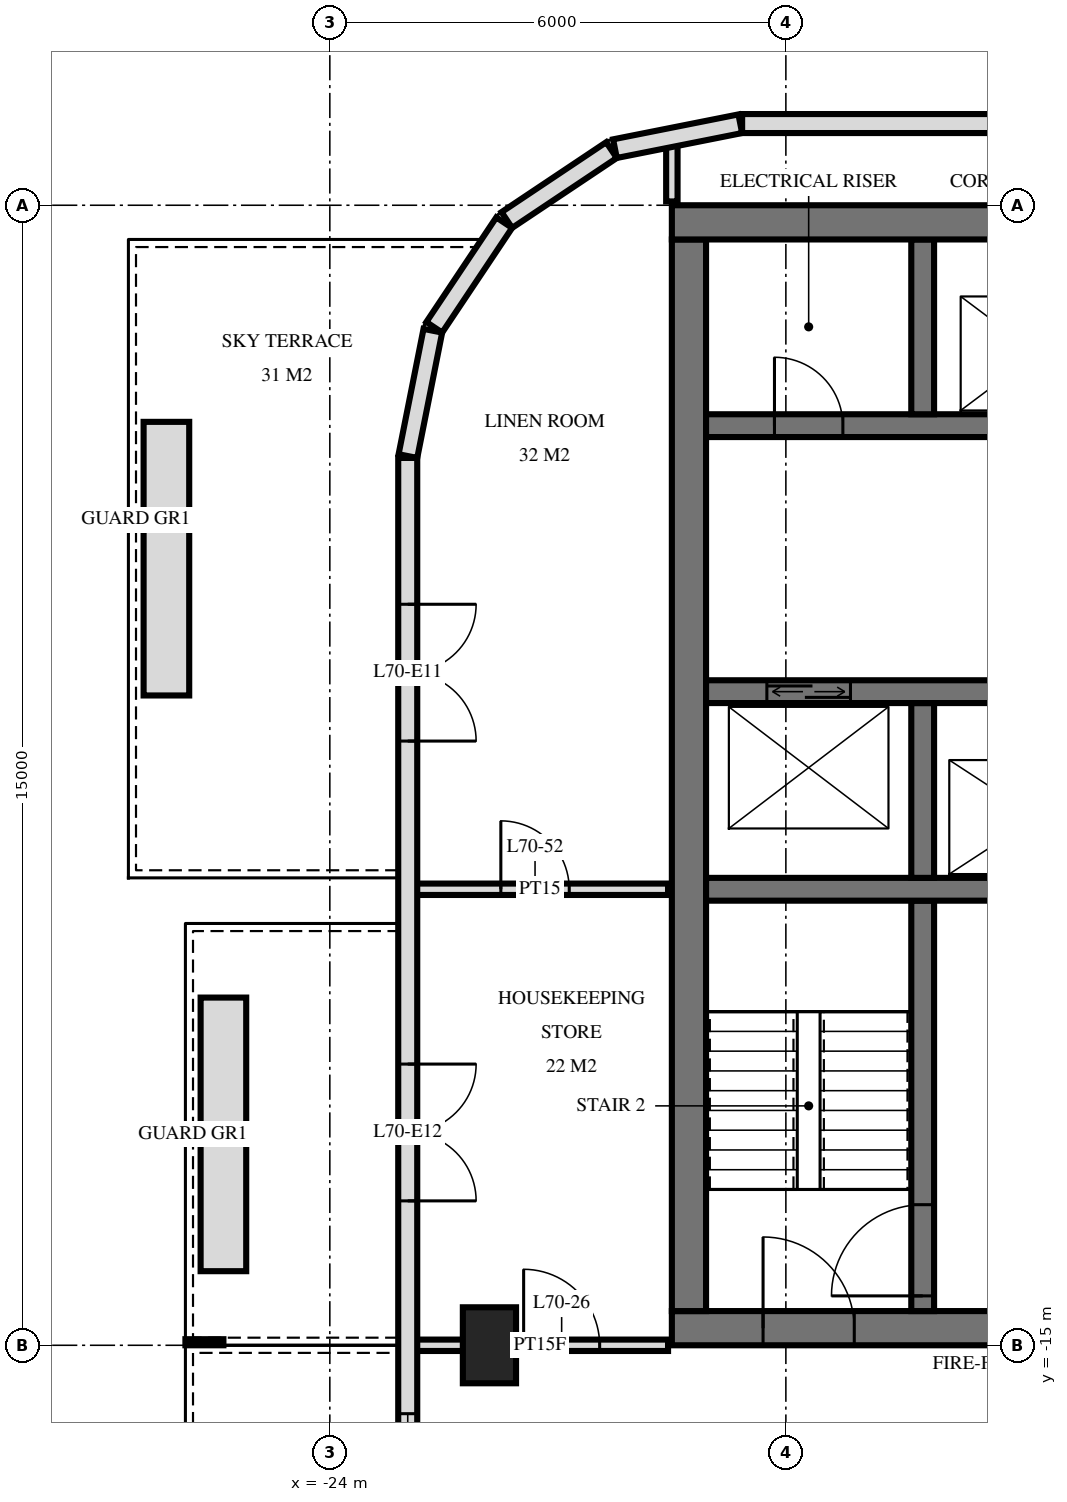
"""IFC4 building model, lengths in metres.
Left out: names, types, materials, properties, quantities, classifications, styles, units other than length and angle.
Written with IfcOpenShell. Run it as: python <this file> out.ifc"""

import sys

from ifc_helpers import new_model, si_unit, direction, frame, frame_2d, origin, origin_2d, place, context, subcontext, project, spatial, rectangle, extrude, element, fill, save


model = new_model("IFC4")
c1 = context("Model", 3, precision=1e-05, world=origin(), true_north=direction((0.0, 1.0)))
c2 = subcontext(c1, "Body", "Model", "MODEL_VIEW")
j1 = project(units=[si_unit("LENGTHUNIT", "METRE"), si_unit("PLANEANGLEUNIT", "RADIAN")], contexts=[c1])
p1 = place(None, origin())
s1 = spatial("IfcSite", under=j1, at=p1, CompositionType="ELEMENT")
p2 = place(p1, origin())
s2 = spatial("IfcBuilding", under=s1, at=p2, CompositionType="ELEMENT")
p3 = place(p2, frame((0.0, 0.0, 266.6)))
s3 = spatial("IfcBuildingStorey", under=s2, at=p3, CompositionType="ELEMENT", Elevation=266.6)
p4 = place(p3, frame((-21.9, -15.0, 0.0), z_axis=(0.0, 0.0, 1.0), x_axis=(0.0, 1.0, 0.0)))
e1 = element("IfcColumn", 1, at=p4, inside=s3, PredefinedType="COLUMN", context=c2, shape_type="SweptSolid", body=[
    extrude(rectangle(XDim=1.0, YDim=0.7, at=origin_2d()), origin(), (0.0, 0.0, 1.0), 3.5),
])
p5 = place(p3, frame((-19.5, -0.225, 0.0), z_axis=(0.0, 0.0, 1.0), x_axis=(1.0, 0.0, 0.0)))
e2 = element("IfcWall", 2, at=p5, inside=s3, PredefinedType="SHEAR", context=c2, shape_type="SweptSolid", body=[
    extrude(rectangle(XDim=9.5, YDim=0.45, at=frame_2d((4.75, 0.0))), origin(), (0.0, 0.0, 1.0), 3.5),
])
p6 = place(p3, frame((-19.5, -14.775, 0.0), z_axis=(0.0, 0.0, 1.0), x_axis=(1.0, 0.0, 0.0)))
e3 = element("IfcWall", 3, at=p6, inside=s3, PredefinedType="SHEAR", context=c2, shape_type="SweptSolid", body=[
    extrude(rectangle(XDim=9.5, YDim=0.45, at=frame_2d((4.75, 0.0))), origin(), (0.0, 0.0, 1.0), 3.5),
])
p7 = place(p6, frame((1.2, 0.0, 0.0)))
e4 = element("IfcOpeningElement", 4, at=p7, cuts=e3, PredefinedType="OPENING", context=c2, shape_type="SweptSolid", body=[
    extrude(rectangle(XDim=1.2, YDim=2.1, at=frame_2d((0.6, 1.05))), frame((0.0, 0.235, 0.0), z_axis=(0.0, -1.0, 0.0), x_axis=(1.0, 0.0, 0.0)), (0.0, 0.0, 1.0), 0.47),
])
p8 = place(p6, frame((4.25, 0.0, 0.0)))
e5 = element("IfcOpeningElement", 5, at=p8, cuts=e3, PredefinedType="OPENING", context=c2, shape_type="SweptSolid", body=[
    extrude(rectangle(XDim=1.1, YDim=2.1, at=frame_2d((0.55, 1.05))), frame((0.0, 0.235, 0.0), z_axis=(0.0, -1.0, 0.0), x_axis=(1.0, 0.0, 0.0)), (0.0, 0.0, 1.0), 0.47),
])
p9 = place(p3, frame((-19.275, -14.55, 0.0), z_axis=(0.0, 0.0, 1.0), x_axis=(0.0, 1.0, 0.0)))
e6 = element("IfcWall", 6, at=p9, inside=s3, PredefinedType="SHEAR", context=c2, shape_type="SweptSolid", body=[
    extrude(rectangle(XDim=14.1, YDim=0.45, at=frame_2d((7.05, 0.0))), origin(), (0.0, 0.0, 1.0), 3.5),
])
p10 = place(p3, frame((-19.05, -2.9, 0.0), z_axis=(0.0, 0.0, 1.0), x_axis=(1.0, 0.0, 0.0)))
e7 = element("IfcWall", 7, at=p10, inside=s3, PredefinedType="SHEAR", context=c2, shape_type="SweptSolid", body=[
    extrude(rectangle(XDim=8.7, YDim=0.3, at=frame_2d((4.35, 0.0))), origin(), (0.0, 0.0, 1.0), 3.5),
])
p11 = place(p10, frame((6.8, 0.0, 0.0)))
e8 = element("IfcOpeningElement", 8, at=p11, cuts=e7, PredefinedType="OPENING", context=c2, shape_type="SweptSolid", body=[
    extrude(rectangle(XDim=1.1, YDim=2.1, at=frame_2d((0.55, 1.05))), frame((0.0, 0.16, 0.0), z_axis=(0.0, -1.0, 0.0), x_axis=(1.0, 0.0, 0.0)), (0.0, 0.0, 1.0), 0.32),
])
p12 = place(p10, frame((3.8, 0.0, 0.0)))
e9 = element("IfcOpeningElement", 9, at=p12, cuts=e7, PredefinedType="OPENING", context=c2, shape_type="SweptSolid", body=[
    extrude(rectangle(XDim=1.1, YDim=2.1, at=frame_2d((0.55, 1.05))), frame((0.0, 0.16, 0.0), z_axis=(0.0, -1.0, 0.0), x_axis=(1.0, 0.0, 0.0)), (0.0, 0.0, 1.0), 0.32),
])
p13 = place(p10, frame((0.9, 0.0, 0.0)))
e10 = element("IfcOpeningElement", 10, at=p13, cuts=e7, PredefinedType="OPENING", context=c2, shape_type="SweptSolid", body=[
    extrude(rectangle(XDim=0.9, YDim=2.1, at=frame_2d((0.45, 1.05))), frame((0.0, 0.16, 0.0), z_axis=(0.0, -1.0, 0.0), x_axis=(1.0, 0.0, 0.0)), (0.0, 0.0, 1.0), 0.32),
])
p14 = place(p3, frame((-19.05, -6.4, 0.0), z_axis=(0.0, 0.0, 1.0), x_axis=(1.0, 0.0, 0.0)))
e11 = element("IfcWall", 11, at=p14, inside=s3, PredefinedType="SHEAR", context=c2, shape_type="SweptSolid", body=[
    extrude(rectangle(XDim=8.7, YDim=0.3, at=frame_2d((4.35, 0.0))), origin(), (0.0, 0.0, 1.0), 3.5),
])
p15 = place(p14, frame((0.8, 0.0, 0.0)))
e12 = element("IfcOpeningElement", 12, at=p15, cuts=e11, PredefinedType="OPENING", context=c2, shape_type="SweptSolid", body=[
    extrude(rectangle(XDim=1.1, YDim=2.1, at=frame_2d((0.55, 1.05))), frame((0.0, 0.16, 0.0), z_axis=(0.0, -1.0, 0.0), x_axis=(1.0, 0.0, 0.0)), (0.0, 0.0, 1.0), 0.32),
])
p16 = place(p3, frame((-19.05, -9.0, 0.0), z_axis=(0.0, 0.0, 1.0), x_axis=(1.0, 0.0, 0.0)))
e13 = element("IfcWall", 13, at=p16, inside=s3, PredefinedType="SHEAR", context=c2, shape_type="SweptSolid", body=[
    extrude(rectangle(XDim=8.7, YDim=0.3, at=frame_2d((4.35, 0.0))), origin(), (0.0, 0.0, 1.0), 3.5),
])
p17 = place(p16, frame((3.8, 0.0, 0.0)))
e14 = element("IfcOpeningElement", 14, at=p17, cuts=e13, PredefinedType="OPENING", context=c2, shape_type="SweptSolid", body=[
    extrude(rectangle(XDim=1.1, YDim=2.1, at=frame_2d((0.55, 1.05))), frame((0.0, 0.16, 0.0), z_axis=(0.0, -1.0, 0.0), x_axis=(1.0, 0.0, 0.0)), (0.0, 0.0, 1.0), 0.32),
])
for number, where, z_axis, x_axis in (
    (15, (-16.2, -2.75, 0.0), (0.0, 0.0, 1.0), (0.0, 1.0, 0.0)),
    (16, (-16.2, -8.85, 0.0), (0.0, 0.0, 1.0), (0.0, 1.0, 0.0)),
):
    element("IfcWall", number, at=place(p3, frame(where, z_axis=z_axis, x_axis=x_axis)), inside=s3, PredefinedType="SHEAR", context=c2, shape_type="SweptSolid", body=[
        extrude(rectangle(XDim=2.3, YDim=0.3, at=frame_2d((1.15, 0.0))), origin(), (0.0, 0.0, 1.0), 3.5),
    ])
p18 = place(p3, frame((-16.2, -14.55, 0.0), z_axis=(0.0, 0.0, 1.0), x_axis=(0.0, 1.0, 0.0)))
e17 = element("IfcWall", 17, at=p18, inside=s3, PredefinedType="SHEAR", context=c2, shape_type="SweptSolid", body=[
    extrude(rectangle(XDim=5.4, YDim=0.3, at=frame_2d((2.7, 0.0))), origin(), (0.0, 0.0, 1.0), 3.5),
])
p19 = place(p18, frame((0.2, 0.0, 0.0)))
e18 = element("IfcOpeningElement", 18, at=p19, cuts=e17, PredefinedType="OPENING", context=c2, shape_type="SweptSolid", body=[
    extrude(rectangle(XDim=1.2, YDim=2.1, at=frame_2d((0.6, 1.05))), frame((0.0, 0.16, 0.0), z_axis=(0.0, -1.0, 0.0), x_axis=(1.0, 0.0, 0.0)), (0.0, 0.0, 1.0), 0.32),
])
p20 = place(p3, frame((18.575, 1.075, 0.0), z_axis=(0.0, 0.0, 1.0), x_axis=(-1.0, 0.0, 0.0)))
e19 = element("IfcWall", 19, at=p20, inside=s3, PredefinedType="SOLIDWALL", context=c2, shape_type="SweptSolid", body=[
    extrude(rectangle(XDim=37.151, YDim=0.25, at=frame_2d((18.575, 0.0))), origin(), (0.0, 0.0, 1.0), 3.22),
])
p21 = place(p20, frame((9.275, 0.0, 0.9)))
e20 = element("IfcOpeningElement", 20, at=p21, cuts=e19, PredefinedType="OPENING", context=c2, shape_type="SweptSolid", body=[
    extrude(rectangle(XDim=2.4, YDim=1.5, at=frame_2d((1.2, 0.75))), frame((0.0, 0.135, 0.0), z_axis=(0.0, -1.0, 0.0), x_axis=(1.0, 0.0, 0.0)), (0.0, 0.0, 1.0), 0.27),
])
p22 = place(p20, frame((15.275, 0.0, 0.9)))
e21 = element("IfcOpeningElement", 21, at=p22, cuts=e19, PredefinedType="OPENING", context=c2, shape_type="SweptSolid", body=[
    extrude(rectangle(XDim=2.4, YDim=1.5, at=frame_2d((1.2, 0.75))), frame((0.0, 0.135, 0.0), z_axis=(0.0, -1.0, 0.0), x_axis=(1.0, 0.0, 0.0)), (0.0, 0.0, 1.0), 0.27),
])
p23 = place(p20, frame((25.125, 0.0, 0.9)))
e22 = element("IfcOpeningElement", 22, at=p23, cuts=e19, PredefinedType="OPENING", context=c2, shape_type="SweptSolid", body=[
    extrude(rectangle(XDim=2.4, YDim=1.5, at=frame_2d((1.2, 0.75))), frame((0.0, 0.135, 0.0), z_axis=(0.0, -1.0, 0.0), x_axis=(1.0, 0.0, 0.0)), (0.0, 0.0, 1.0), 0.27),
])
p24 = place(p3, frame((-18.6, 1.073, 0.0), z_axis=(0.0, 0.0, 1.0), x_axis=(-0.980797896849, -0.195026884138, 0.0)))
e23 = element("IfcWall", 23, at=p24, inside=s3, PredefinedType="SOLIDWALL", context=c2, shape_type="SweptSolid", body=[
    extrude(rectangle(XDim=1.681, YDim=0.25, at=frame_2d((0.841, 0.0))), origin(), (0.0, 0.0, 1.0), 3.22),
])
for number, where, z_axis, x_axis in (
    (24, (-20.294, 0.726, 0.0), (0.0, 0.0, 1.0), (-0.831, -0.556, 0.0)),
    (25, (-21.706, -0.229, 0.0), (0.0, 0.0, 1.0), (-0.556, -0.831, 0.0)),
):
    element("IfcWall", number, at=place(p3, frame(where, z_axis=z_axis, x_axis=x_axis)), inside=s3, PredefinedType="SOLIDWALL", context=c2, shape_type="SweptSolid", body=[
        extrude(rectangle(XDim=1.656, YDim=0.25, at=frame_2d((0.828, 0.0))), origin(), (0.0, 0.0, 1.0), 3.22),
    ])
p25 = place(p3, frame((-22.645, -1.651, 0.0), z_axis=(0.0, 0.0, 1.0), x_axis=(-0.19513878023, -0.980775640221, 0.0)))
e26 = element("IfcWall", 26, at=p25, inside=s3, PredefinedType="SOLIDWALL", context=c2, shape_type="SweptSolid", body=[
    extrude(rectangle(XDim=1.681, YDim=0.25, at=frame_2d((0.841, 0.0))), origin(), (0.0, 0.0, 1.0), 3.22),
])
p26 = place(p3, frame((-22.975, -3.325, 0.0), z_axis=(0.0, 0.0, 1.0), x_axis=(0.0, -1.0, 0.0)))
e27 = element("IfcWall", 27, at=p26, inside=s3, PredefinedType="SOLIDWALL", context=c2, shape_type="SweptSolid", body=[
    extrude(rectangle(XDim=25.951, YDim=0.25, at=frame_2d((12.975, 0.0))), origin(), (0.0, 0.0, 1.0), 3.22),
])
p27 = place(p26, frame((1.925, 0.0, 0.0)))
e28 = element("IfcOpeningElement", 28, at=p27, cuts=e27, PredefinedType="OPENING", context=c2, shape_type="SweptSolid", body=[
    extrude(rectangle(XDim=1.8, YDim=2.4, at=frame_2d((0.9, 1.2))), frame((0.0, 0.135, 0.0), z_axis=(0.0, -1.0, 0.0), x_axis=(1.0, 0.0, 0.0)), (0.0, 0.0, 1.0), 0.27),
])
p28 = place(p26, frame((7.975, 0.0, 0.0)))
e29 = element("IfcOpeningElement", 29, at=p28, cuts=e27, PredefinedType="OPENING", context=c2, shape_type="SweptSolid", body=[
    extrude(rectangle(XDim=1.8, YDim=2.4, at=frame_2d((0.9, 1.2))), frame((0.0, 0.135, 0.0), z_axis=(0.0, -1.0, 0.0), x_axis=(1.0, 0.0, 0.0)), (0.0, 0.0, 1.0), 0.27),
])
p29 = place(p26, frame((12.575, 0.0, 0.9)))
e30 = element("IfcOpeningElement", 30, at=p29, cuts=e27, PredefinedType="OPENING", context=c2, shape_type="SweptSolid", body=[
    extrude(rectangle(XDim=1.2, YDim=1.5, at=frame_2d((0.6, 0.75))), frame((0.0, 0.135, 0.0), z_axis=(0.0, -1.0, 0.0), x_axis=(1.0, 0.0, 0.0)), (0.0, 0.0, 1.0), 0.27),
])
p30 = place(p26, frame((16.7, 0.0, 0.0)))
e31 = element("IfcOpeningElement", 31, at=p30, cuts=e27, PredefinedType="OPENING", context=c2, shape_type="SweptSolid", body=[
    extrude(rectangle(XDim=1.8, YDim=2.4, at=frame_2d((0.9, 1.2))), frame((0.0, 0.135, 0.0), z_axis=(0.0, -1.0, 0.0), x_axis=(1.0, 0.0, 0.0)), (0.0, 0.0, 1.0), 0.27),
])
p31 = place(p26, frame((22.25, 0.0, 0.0)))
e32 = element("IfcOpeningElement", 32, at=p31, cuts=e27, PredefinedType="OPENING", context=c2, shape_type="SweptSolid", body=[
    extrude(rectangle(XDim=1.8, YDim=2.4, at=frame_2d((0.9, 1.2))), frame((0.0, 0.135, 0.0), z_axis=(0.0, -1.0, 0.0), x_axis=(1.0, 0.0, 0.0)), (0.0, 0.0, 1.0), 0.27),
])
for number, where, z_axis, x_axis in (
    (33, (-25.4, -14.025, 0.0), (0.0, 0.0, 1.0), (0.0, 1.0, 0.0)),
    (34, (-26.15, -6.45, 0.0), (0.0, 0.0, 1.0), (0.0, 1.0, 0.0)),
):
    element("IfcWall", number, at=place(p3, frame(where, z_axis=z_axis, x_axis=x_axis)), inside=s3, PredefinedType="USERDEFINED", context=c2, shape_type="SweptSolid", body=[
        extrude(rectangle(XDim=3.6, YDim=0.6, at=frame_2d((1.8, 0.0))), origin(), (0.0, 0.0, 1.0), 0.65),
    ])
p32 = place(p3, frame((-19.5, 0.05, 0.0), z_axis=(0.0, 0.0, 1.0), x_axis=(0.0, 1.0, 0.0)))
e35 = element("IfcWall", 35, at=p32, inside=s3, PredefinedType="PARTITIONING", context=c2, shape_type="SweptSolid", body=[
    extrude(rectangle(XDim=0.787, YDim=0.15, at=frame_2d((0.394, 0.0))), origin(), (0.0, 0.0, 1.0), 3.22),
])
p33 = place(p3, frame((-22.92, -15.0, 0.0), z_axis=(0.0, 0.0, 1.0), x_axis=(1.0, 0.0, 0.0)))
e36 = element("IfcWall", 36, at=p33, inside=s3, PredefinedType="PARTITIONING", context=c2, shape_type="SweptSolid", body=[
    extrude(rectangle(XDim=3.37, YDim=0.15, at=frame_2d((1.685, 0.0))), origin(), (0.0, 0.0, 1.0), 3.22),
])
p34 = place(p33, frame((1.47, 0.0, 0.0)))
e37 = element("IfcOpeningElement", 37, at=p34, cuts=e36, PredefinedType="OPENING", context=c2, shape_type="SweptSolid", body=[
    extrude(rectangle(XDim=1.0, YDim=2.1, at=frame_2d((0.5, 1.05))), frame((0.0, 0.085, 0.0), z_axis=(0.0, -1.0, 0.0), x_axis=(1.0, 0.0, 0.0)), (0.0, 0.0, 1.0), 0.17),
])
p35 = place(p3, frame((-22.92, -9.0, 0.0), z_axis=(0.0, 0.0, 1.0), x_axis=(1.0, 0.0, 0.0)))
e38 = element("IfcWall", 38, at=p35, inside=s3, PredefinedType="PARTITIONING", context=c2, shape_type="SweptSolid", body=[
    extrude(rectangle(XDim=3.37, YDim=0.15, at=frame_2d((1.685, 0.0))), origin(), (0.0, 0.0, 1.0), 3.22),
])
p36 = place(p35, frame((1.17, 0.0, 0.0)))
e39 = element("IfcOpeningElement", 39, at=p36, cuts=e38, PredefinedType="OPENING", context=c2, shape_type="SweptSolid", body=[
    extrude(rectangle(XDim=0.9, YDim=2.1, at=frame_2d((0.45, 1.05))), frame((0.0, 0.085, 0.0), z_axis=(0.0, -1.0, 0.0), x_axis=(1.0, 0.0, 0.0)), (0.0, 0.0, 1.0), 0.17),
])
p37 = place(p27, origin())
e40 = element("IfcDoor", 40, at=p37, inside=s3, OperationType="DOUBLE_DOOR_SINGLE_SWING", PredefinedType="DOOR", context=c2, shape_type="SweptSolid", body=[
    extrude(rectangle(XDim=1.8, YDim=2.4, at=frame_2d((0.9, 1.2))), frame((0.0, 0.025, 0.0), z_axis=(0.0, -1.0, 0.0), x_axis=(1.0, 0.0, 0.0)), (0.0, 0.0, 1.0), 0.05),
])
fill(e28, e40)
p38 = place(p28, origin())
e41 = element("IfcDoor", 41, at=p38, inside=s3, OperationType="DOUBLE_DOOR_SINGLE_SWING", PredefinedType="DOOR", context=c2, shape_type="SweptSolid", body=[
    extrude(rectangle(XDim=1.8, YDim=2.4, at=frame_2d((0.9, 1.2))), frame((0.0, 0.025, 0.0), z_axis=(0.0, -1.0, 0.0), x_axis=(1.0, 0.0, 0.0)), (0.0, 0.0, 1.0), 0.05),
])
fill(e29, e41)
p39 = place(p29, origin())
e42 = element("IfcWindow", 42, at=p39, inside=s3, PartitioningType="SINGLE_PANEL", PredefinedType="WINDOW", context=c2, shape_type="SweptSolid", body=[
    extrude(rectangle(XDim=1.2, YDim=1.5, at=frame_2d((0.6, 0.75))), frame((0.0, 0.03, 0.0), z_axis=(0.0, -1.0, 0.0), x_axis=(1.0, 0.0, 0.0)), (0.0, 0.0, 1.0), 0.06),
])
fill(e30, e42)
p40 = place(p15, origin())
e43 = element("IfcDoor", 43, at=p40, inside=s3, OperationType="DOUBLE_DOOR_SLIDING", PredefinedType="USERDEFINED", context=c2, shape_type="SweptSolid", body=[
    extrude(rectangle(XDim=1.1, YDim=2.1, at=frame_2d((0.55, 1.05))), frame((0.0, 0.025, 0.0), z_axis=(0.0, -1.0, 0.0), x_axis=(1.0, 0.0, 0.0)), (0.0, 0.0, 1.0), 0.05),
])
fill(e12, e43)
p41 = place(p7, origin())
e44 = element("IfcDoor", 44, at=p41, inside=s3, OperationType="SINGLE_SWING_RIGHT", PredefinedType="DOOR", context=c2, shape_type="SweptSolid", body=[
    extrude(rectangle(XDim=1.2, YDim=2.1, at=frame_2d((0.6, 1.05))), frame((0.0, 0.025, 0.0), z_axis=(0.0, -1.0, 0.0), x_axis=(1.0, 0.0, 0.0)), (0.0, 0.0, 1.0), 0.05),
])
fill(e4, e44)
p42 = place(p13, origin())
e45 = element("IfcDoor", 45, at=p42, inside=s3, OperationType="SINGLE_SWING_RIGHT", PredefinedType="DOOR", context=c2, shape_type="SweptSolid", body=[
    extrude(rectangle(XDim=0.9, YDim=2.1, at=frame_2d((0.45, 1.05))), frame((0.0, 0.025, 0.0), z_axis=(0.0, -1.0, 0.0), x_axis=(1.0, 0.0, 0.0)), (0.0, 0.0, 1.0), 0.05),
])
fill(e10, e45)
p43 = place(p19, origin())
e46 = element("IfcDoor", 46, at=p43, inside=s3, OperationType="SINGLE_SWING_RIGHT", PredefinedType="DOOR", context=c2, shape_type="SweptSolid", body=[
    extrude(rectangle(XDim=1.2, YDim=2.1, at=frame_2d((0.6, 1.05))), frame((0.0, 0.025, 0.0), z_axis=(0.0, -1.0, 0.0), x_axis=(1.0, 0.0, 0.0)), (0.0, 0.0, 1.0), 0.05),
])
fill(e18, e46)
p44 = place(p34, origin())
e47 = element("IfcDoor", 47, at=p44, inside=s3, OperationType="SINGLE_SWING_RIGHT", PredefinedType="DOOR", context=c2, shape_type="SweptSolid", body=[
    extrude(rectangle(XDim=1.0, YDim=2.1, at=frame_2d((0.5, 1.05))), frame((0.0, 0.025, 0.0), z_axis=(0.0, -1.0, 0.0), x_axis=(1.0, 0.0, 0.0)), (0.0, 0.0, 1.0), 0.05),
])
fill(e37, e47)
p45 = place(p36, origin())
e48 = element("IfcDoor", 48, at=p45, inside=s3, OperationType="SINGLE_SWING_RIGHT", PredefinedType="DOOR", context=c2, shape_type="SweptSolid", body=[
    extrude(rectangle(XDim=0.9, YDim=2.1, at=frame_2d((0.45, 1.05))), frame((0.0, 0.025, 0.0), z_axis=(0.0, -1.0, 0.0), x_axis=(1.0, 0.0, 0.0)), (0.0, 0.0, 1.0), 0.05),
])
fill(e39, e48)
save(model, sys.argv[1])
